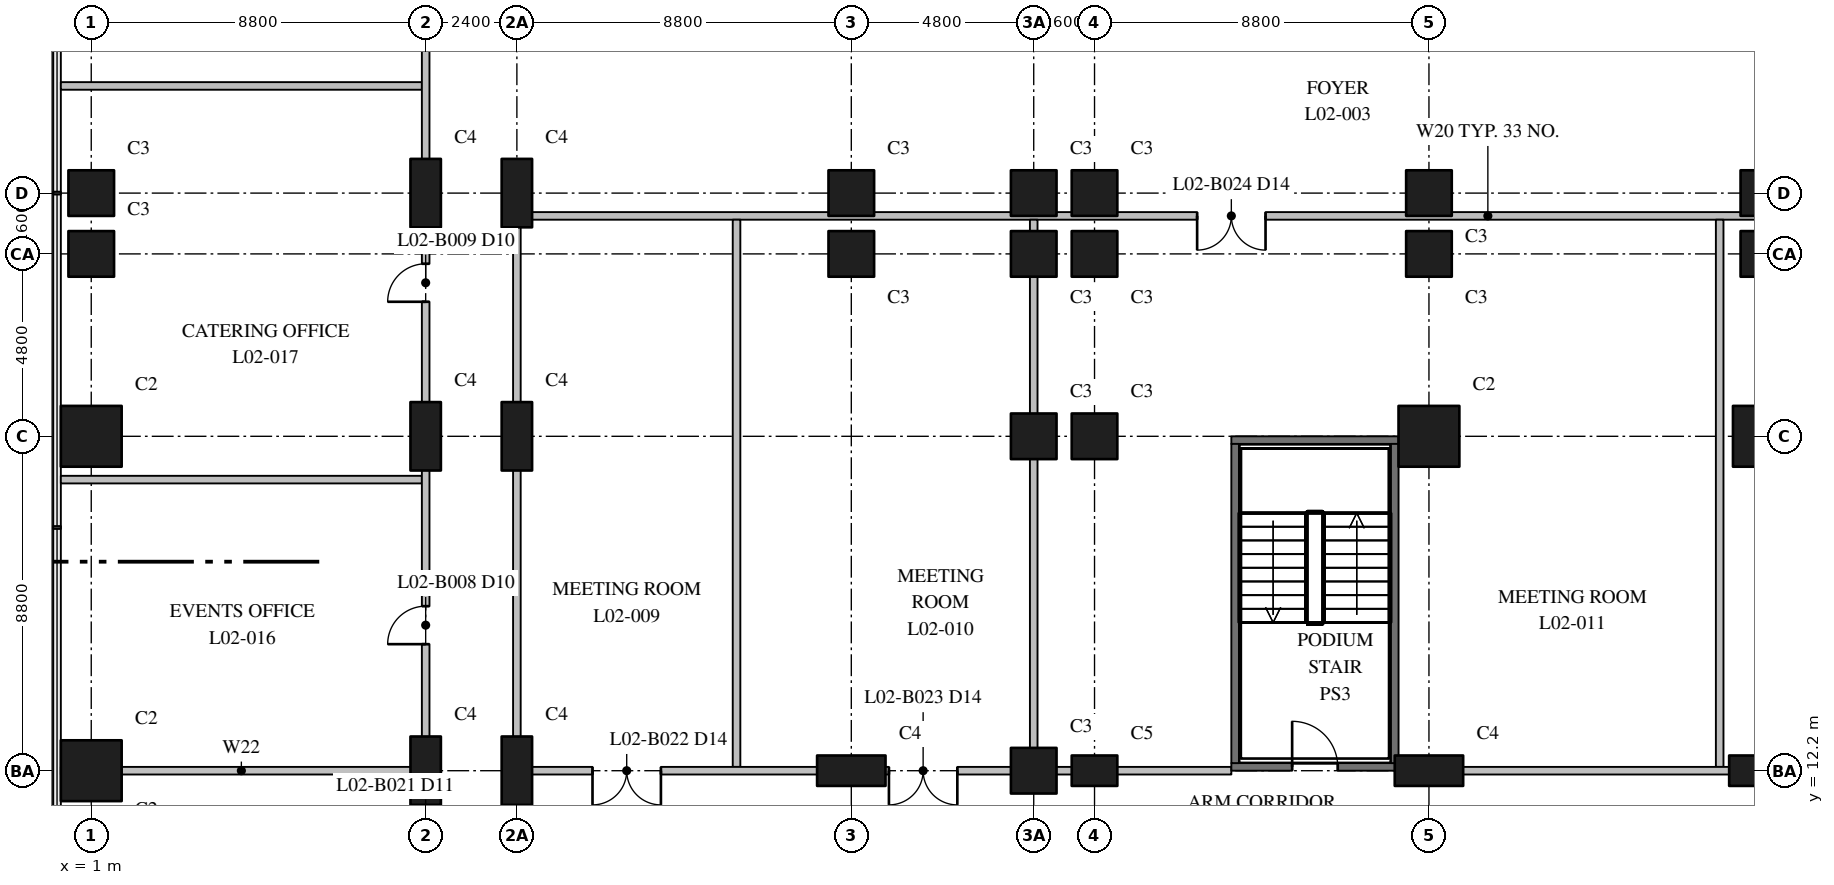
"""IFC4 building model, lengths in metres.
Left out: names, types, materials, properties, quantities, classifications, styles, units other than length and angle.
Written with IfcOpenShell. Run it as: python <this file> out.ifc"""

import sys

from ifc_helpers import new_model, si_unit, direction, frame, frame_2d, origin, origin_2d, place, context, subcontext, project, spatial, rectangle, extrude, element, fill, save


model = new_model("IFC4")
c1 = context("Model", 3, precision=1e-05, world=origin(), true_north=direction((0.0, 1.0)))
c2 = subcontext(c1, "Body", "Model", "MODEL_VIEW")
j1 = project(units=[si_unit("LENGTHUNIT", "METRE"), si_unit("PLANEANGLEUNIT", "RADIAN")], contexts=[c1])
p1 = place(None, origin())
s1 = spatial("IfcSite", under=j1, at=p1, CompositionType="ELEMENT")
p2 = place(p1, origin())
s2 = spatial("IfcBuilding", under=s1, at=p2, CompositionType="ELEMENT")
p3 = place(p2, frame((0.0, 0.0, 13.0)))
s3 = spatial("IfcBuildingStorey", under=s2, at=p3, CompositionType="ELEMENT", Elevation=13.0)
for number, where, z_axis, x_axis in (
    (1, (1.0, 12.2, 0.0), (0.0, 0.0, 1.0), (1.0, 0.0, 0.0)),
    (2, (1.0, 21.0, 0.0), (0.0, 0.0, 1.0), (1.0, 0.0, 0.0)),
):
    element("IfcColumn", number, at=place(p3, frame(where, z_axis=z_axis, x_axis=x_axis)), inside=s3, PredefinedType="COLUMN", context=c2, shape_type="SweptSolid", body=[
        extrude(rectangle(XDim=1.6, YDim=1.6, at=origin_2d()), origin(), (0.0, 0.0, 1.0), 5.0),
    ])
for number, where, z_axis, x_axis in (
    (3, (1.0, 25.8, 0.0), (0.0, 0.0, 1.0), (1.0, 0.0, 0.0)),
    (4, (1.0, 27.4, 0.0), (0.0, 0.0, 1.0), (1.0, 0.0, 0.0)),
):
    element("IfcColumn", number, at=place(p3, frame(where, z_axis=z_axis, x_axis=x_axis)), inside=s3, PredefinedType="COLUMN", context=c2, shape_type="SweptSolid", body=[
        extrude(rectangle(XDim=1.2, YDim=1.2, at=origin_2d()), origin(), (0.0, 0.0, 1.0), 5.0),
    ])
for number, where, z_axis, x_axis in (
    (5, (9.8, 12.2, 0.0), (0.0, 0.0, 1.0), (0.0, 1.0, 0.0)),
    (6, (9.8, 21.0, 0.0), (0.0, 0.0, 1.0), (0.0, 1.0, 0.0)),
    (7, (9.8, 27.4, 0.0), (0.0, 0.0, 1.0), (0.0, 1.0, 0.0)),
    (8, (12.2, 12.2, 0.0), (0.0, 0.0, 1.0), (0.0, 1.0, 0.0)),
    (9, (12.2, 21.0, 0.0), (0.0, 0.0, 1.0), (0.0, 1.0, 0.0)),
    (10, (12.2, 27.4, 0.0), (0.0, 0.0, 1.0), (0.0, 1.0, 0.0)),
    (11, (21.0, 12.2, 0.0), (0.0, 0.0, 1.0), (1.0, 0.0, 0.0)),
):
    element("IfcColumn", number, at=place(p3, frame(where, z_axis=z_axis, x_axis=x_axis)), inside=s3, PredefinedType="COLUMN", context=c2, shape_type="SweptSolid", body=[
        extrude(rectangle(XDim=1.8, YDim=0.8, at=origin_2d()), origin(), (0.0, 0.0, 1.0), 5.0),
    ])
for number, where, z_axis, x_axis in (
    (12, (21.0, 25.8, 0.0), (0.0, 0.0, 1.0), (1.0, 0.0, 0.0)),
    (13, (21.0, 27.4, 0.0), (0.0, 0.0, 1.0), (1.0, 0.0, 0.0)),
    (14, (25.8, 12.2, 0.0), (0.0, 0.0, 1.0), (1.0, 0.0, 0.0)),
    (15, (25.8, 21.0, 0.0), (0.0, 0.0, 1.0), (1.0, 0.0, 0.0)),
    (16, (25.8, 25.8, 0.0), (0.0, 0.0, 1.0), (1.0, 0.0, 0.0)),
    (17, (25.8, 27.4, 0.0), (0.0, 0.0, 1.0), (1.0, 0.0, 0.0)),
):
    element("IfcColumn", number, at=place(p3, frame(where, z_axis=z_axis, x_axis=x_axis)), inside=s3, PredefinedType="COLUMN", context=c2, shape_type="SweptSolid", body=[
        extrude(rectangle(XDim=1.2, YDim=1.2, at=origin_2d()), origin(), (0.0, 0.0, 1.0), 5.0),
    ])
p4 = place(p3, frame((27.4, 12.2, 0.0), z_axis=(0.0, 0.0, 1.0), x_axis=(1.0, 0.0, 0.0)))
e18 = element("IfcColumn", 18, at=p4, inside=s3, PredefinedType="COLUMN", context=c2, shape_type="SweptSolid", body=[
    extrude(rectangle(XDim=1.2, YDim=0.8, at=origin_2d()), origin(), (0.0, 0.0, 1.0), 5.0),
])
for number, where, z_axis, x_axis in (
    (19, (27.4, 21.0, 0.0), (0.0, 0.0, 1.0), (1.0, 0.0, 0.0)),
    (20, (27.4, 25.8, 0.0), (0.0, 0.0, 1.0), (1.0, 0.0, 0.0)),
):
    element("IfcColumn", number, at=place(p3, frame(where, z_axis=z_axis, x_axis=x_axis)), inside=s3, PredefinedType="COLUMN", context=c2, shape_type="SweptSolid", body=[
        extrude(rectangle(XDim=1.2, YDim=1.2, at=origin_2d()), origin(), (0.0, 0.0, 1.0), 5.0),
    ])
p5 = place(p3, frame((36.2, 12.2, 0.0), z_axis=(0.0, 0.0, 1.0), x_axis=(1.0, 0.0, 0.0)))
e21 = element("IfcColumn", 21, at=p5, inside=s3, PredefinedType="COLUMN", context=c2, shape_type="SweptSolid", body=[
    extrude(rectangle(XDim=1.8, YDim=0.8, at=origin_2d()), origin(), (0.0, 0.0, 1.0), 5.0),
])
p6 = place(p3, frame((36.2, 21.0, 0.0), z_axis=(0.0, 0.0, 1.0), x_axis=(1.0, 0.0, 0.0)))
e22 = element("IfcColumn", 22, at=p6, inside=s3, PredefinedType="COLUMN", context=c2, shape_type="SweptSolid", body=[
    extrude(rectangle(XDim=1.6, YDim=1.6, at=origin_2d()), origin(), (0.0, 0.0, 1.0), 5.0),
])
p7 = place(p3, frame((36.2, 25.8, 0.0), z_axis=(0.0, 0.0, 1.0), x_axis=(1.0, 0.0, 0.0)))
e23 = element("IfcColumn", 23, at=p7, inside=s3, PredefinedType="COLUMN", context=c2, shape_type="SweptSolid", body=[
    extrude(rectangle(XDim=1.2, YDim=1.2, at=origin_2d()), origin(), (0.0, 0.0, 1.0), 5.0),
])
p8 = place(p3, frame((45.0, 12.2, 0.0), z_axis=(0.0, 0.0, 1.0), x_axis=(1.0, 0.0, 0.0)))
e24 = element("IfcColumn", 24, at=p8, inside=s3, PredefinedType="COLUMN", context=c2, shape_type="SweptSolid", body=[
    extrude(rectangle(XDim=1.8, YDim=0.8, at=origin_2d()), origin(), (0.0, 0.0, 1.0), 5.0),
])
p9 = place(p3, frame((45.0, 21.0, 0.0), z_axis=(0.0, 0.0, 1.0), x_axis=(1.0, 0.0, 0.0)))
e25 = element("IfcColumn", 25, at=p9, inside=s3, PredefinedType="COLUMN", context=c2, shape_type="SweptSolid", body=[
    extrude(rectangle(XDim=1.6, YDim=1.6, at=origin_2d()), origin(), (0.0, 0.0, 1.0), 5.0),
])
for number, where, z_axis, x_axis in (
    (26, (45.0, 25.8, 0.0), (0.0, 0.0, 1.0), (1.0, 0.0, 0.0)),
    (27, (27.4, 27.4, 0.0), (0.0, 0.0, 1.0), (1.0, 0.0, 0.0)),
    (28, (36.2, 27.4, 0.0), (0.0, 0.0, 1.0), (1.0, 0.0, 0.0)),
    (29, (45.0, 27.4, 0.0), (0.0, 0.0, 1.0), (1.0, 0.0, 0.0)),
):
    element("IfcColumn", number, at=place(p3, frame(where, z_axis=z_axis, x_axis=x_axis)), inside=s3, PredefinedType="COLUMN", context=c2, shape_type="SweptSolid", body=[
        extrude(rectangle(XDim=1.2, YDim=1.2, at=origin_2d()), origin(), (0.0, 0.0, 1.0), 5.0),
    ])
p10 = place(p3, frame((31.0, 12.3, 0.0), z_axis=(0.0, 0.0, 1.0), x_axis=(1.0, 0.0, 0.0)))
e30 = element("IfcWall", 30, at=p10, inside=s3, PredefinedType="SHEAR", context=c2, shape_type="SweptSolid", body=[
    extrude(rectangle(XDim=4.4, YDim=0.2, at=frame_2d((2.2, 0.0))), origin(), (0.0, 0.0, 1.0), 4.6),
])
p11 = place(p10, frame((1.6, 0.0, 0.0)))
e31 = element("IfcOpeningElement", 31, at=p11, cuts=e30, PredefinedType="OPENING", context=c2, shape_type="SweptSolid", body=[
    extrude(rectangle(XDim=1.2, YDim=2.1, at=frame_2d((0.6, 1.05))), frame((0.0, 0.11, 0.0), z_axis=(0.0, -1.0, 0.0), x_axis=(1.0, 0.0, 0.0)), (0.0, 0.0, 1.0), 0.22),
])
p12 = place(p3, frame((31.0, 20.9, 0.0), z_axis=(0.0, 0.0, 1.0), x_axis=(1.0, 0.0, 0.0)))
e32 = element("IfcWall", 32, at=p12, inside=s3, PredefinedType="SHEAR", context=c2, shape_type="SweptSolid", body=[
    extrude(rectangle(XDim=4.4, YDim=0.2, at=frame_2d((2.2, 0.0))), origin(), (0.0, 0.0, 1.0), 4.6),
])
for number, where, z_axis, x_axis in (
    (33, (31.1, 12.4, 0.0), (0.0, 0.0, 1.0), (0.0, 1.0, 0.0)),
    (34, (35.3, 12.4, 0.0), (0.0, 0.0, 1.0), (0.0, 1.0, 0.0)),
):
    element("IfcWall", number, at=place(p3, frame(where, z_axis=z_axis, x_axis=x_axis)), inside=s3, PredefinedType="SHEAR", context=c2, shape_type="SweptSolid", body=[
        extrude(rectangle(XDim=8.4, YDim=0.2, at=frame_2d((4.2, 0.0))), origin(), (0.0, 0.0, 1.0), 4.6),
    ])
p13 = place(p3, frame((0.2, 12.2, 0.0), z_axis=(0.0, 0.0, 1.0), x_axis=(1.0, 0.0, 0.0)))
e35 = element("IfcWall", 35, at=p13, inside=s3, PredefinedType="PARTITIONING", context=c2, shape_type="SweptSolid", body=[
    extrude(rectangle(XDim=9.5, YDim=0.2, at=frame_2d((4.75, 0.0))), origin(), (0.0, 0.0, 1.0), 4.6),
])
p14 = place(p3, frame((12.1, 12.2, 0.0), z_axis=(0.0, 0.0, 1.0), x_axis=(1.0, 0.0, 0.0)))
e36 = element("IfcWall", 36, at=p14, inside=s3, PredefinedType="PARTITIONING", context=c2, shape_type="SweptSolid", body=[
    extrude(rectangle(XDim=18.9, YDim=0.2, at=frame_2d((9.45, 0.0))), origin(), (0.0, 0.0, 1.0), 4.6),
])
p15 = place(p14, frame((2.09, 0.0, 0.0)))
e37 = element("IfcOpeningElement", 37, at=p15, cuts=e36, PredefinedType="OPENING", context=c2, shape_type="SweptSolid", body=[
    extrude(rectangle(XDim=1.8, YDim=2.4, at=frame_2d((0.9, 1.2))), frame((0.0, 0.11, 0.0), z_axis=(0.0, -1.0, 0.0), x_axis=(1.0, 0.0, 0.0)), (0.0, 0.0, 1.0), 0.22),
])
p16 = place(p14, frame((9.89, 0.0, 0.0)))
e38 = element("IfcOpeningElement", 38, at=p16, cuts=e36, PredefinedType="OPENING", context=c2, shape_type="SweptSolid", body=[
    extrude(rectangle(XDim=1.8, YDim=2.4, at=frame_2d((0.9, 1.2))), frame((0.0, 0.11, 0.0), z_axis=(0.0, -1.0, 0.0), x_axis=(1.0, 0.0, 0.0)), (0.0, 0.0, 1.0), 0.22),
])
p17 = place(p3, frame((35.4, 12.2, 0.0), z_axis=(0.0, 0.0, 1.0), x_axis=(1.0, 0.0, 0.0)))
e39 = element("IfcWall", 39, at=p17, inside=s3, PredefinedType="PARTITIONING", context=c2, shape_type="SweptSolid", body=[
    extrude(rectangle(XDim=22.4, YDim=0.2, at=frame_2d((11.2, 0.0))), origin(), (0.0, 0.0, 1.0), 4.6),
])
p18 = place(p17, frame((12.525, 0.0, 0.0)))
e40 = element("IfcOpeningElement", 40, at=p18, cuts=e39, PredefinedType="OPENING", context=c2, shape_type="SweptSolid", body=[
    extrude(rectangle(XDim=1.8, YDim=2.4, at=frame_2d((0.9, 1.2))), frame((0.0, 0.11, 0.0), z_axis=(0.0, -1.0, 0.0), x_axis=(1.0, 0.0, 0.0)), (0.0, 0.0, 1.0), 0.22),
])
p19 = place(p3, frame((12.1, 26.8, 0.0), z_axis=(0.0, 0.0, 1.0), x_axis=(1.0, 0.0, 0.0)))
e41 = element("IfcWall", 41, at=p19, inside=s3, PredefinedType="PARTITIONING", context=c2, shape_type="SweptSolid", body=[
    extrude(rectangle(XDim=51.3, YDim=0.2, at=frame_2d((25.65, 0.0))), origin(), (0.0, 0.0, 1.0), 4.6),
])
p20 = place(p19, frame((18.0, 0.0, 0.0)))
e42 = element("IfcOpeningElement", 42, at=p20, cuts=e41, PredefinedType="OPENING", context=c2, shape_type="SweptSolid", body=[
    extrude(rectangle(XDim=1.8, YDim=2.4, at=frame_2d((0.9, 1.2))), frame((0.0, 0.11, 0.0), z_axis=(0.0, -1.0, 0.0), x_axis=(1.0, 0.0, 0.0)), (0.0, 0.0, 1.0), 0.22),
])
p21 = place(p19, frame((45.2, 0.0, 0.0)))
e43 = element("IfcOpeningElement", 43, at=p21, cuts=e41, PredefinedType="OPENING", context=c2, shape_type="SweptSolid", body=[
    extrude(rectangle(XDim=1.8, YDim=2.4, at=frame_2d((0.9, 1.2))), frame((0.0, 0.11, 0.0), z_axis=(0.0, -1.0, 0.0), x_axis=(1.0, 0.0, 0.0)), (0.0, 0.0, 1.0), 0.22),
])
for number, where, z_axis, x_axis in (
    (44, (0.2, 19.86, 0.0), (0.0, 0.0, 1.0), (1.0, 0.0, 0.0)),
    (45, (0.2, 30.22, 0.0), (0.0, 0.0, 1.0), (1.0, 0.0, 0.0)),
):
    element("IfcWall", number, at=place(p3, frame(where, z_axis=z_axis, x_axis=x_axis)), inside=s3, PredefinedType="PARTITIONING", context=c2, shape_type="SweptSolid", body=[
        extrude(rectangle(XDim=9.5, YDim=0.2, at=frame_2d((4.75, 0.0))), origin(), (0.0, 0.0, 1.0), 4.6),
    ])
p22 = place(p3, frame((9.8, 9.8, 0.0), z_axis=(0.0, 0.0, 1.0), x_axis=(0.0, 1.0, 0.0)))
e46 = element("IfcWall", 46, at=p22, inside=s3, PredefinedType="PARTITIONING", context=c2, shape_type="SweptSolid", body=[
    extrude(rectangle(XDim=48.0, YDim=0.2, at=frame_2d((24.0, 0.0))), origin(), (0.0, 0.0, 1.0), 4.6),
])
p23 = place(p22, frame((5.73, 0.0, 0.0)))
e47 = element("IfcOpeningElement", 47, at=p23, cuts=e46, PredefinedType="OPENING", context=c2, shape_type="SweptSolid", body=[
    extrude(rectangle(XDim=1.0, YDim=2.1, at=frame_2d((0.5, 1.05))), frame((0.0, 0.11, 0.0), z_axis=(0.0, -1.0, 0.0), x_axis=(1.0, 0.0, 0.0)), (0.0, 0.0, 1.0), 0.22),
])
p24 = place(p22, frame((14.74, 0.0, 0.0)))
e48 = element("IfcOpeningElement", 48, at=p24, cuts=e46, PredefinedType="OPENING", context=c2, shape_type="SweptSolid", body=[
    extrude(rectangle(XDim=1.0, YDim=2.1, at=frame_2d((0.5, 1.05))), frame((0.0, 0.11, 0.0), z_axis=(0.0, -1.0, 0.0), x_axis=(1.0, 0.0, 0.0)), (0.0, 0.0, 1.0), 0.22),
])
p25 = place(p22, frame((23.075, 0.0, 0.0)))
e49 = element("IfcOpeningElement", 49, at=p25, cuts=e46, PredefinedType="OPENING", context=c2, shape_type="SweptSolid", body=[
    extrude(rectangle(XDim=1.0, YDim=2.1, at=frame_2d((0.5, 1.05))), frame((0.0, 0.11, 0.0), z_axis=(0.0, -1.0, 0.0), x_axis=(1.0, 0.0, 0.0)), (0.0, 0.0, 1.0), 0.22),
])
p26 = place(p22, frame((29.985, 0.0, 0.0)))
e50 = element("IfcOpeningElement", 50, at=p26, cuts=e46, PredefinedType="OPENING", context=c2, shape_type="SweptSolid", body=[
    extrude(rectangle(XDim=1.0, YDim=2.1, at=frame_2d((0.5, 1.05))), frame((0.0, 0.11, 0.0), z_axis=(0.0, -1.0, 0.0), x_axis=(1.0, 0.0, 0.0)), (0.0, 0.0, 1.0), 0.22),
])
p27 = place(p22, frame((36.668, 0.0, 0.0)))
e51 = element("IfcOpeningElement", 51, at=p27, cuts=e46, PredefinedType="OPENING", context=c2, shape_type="SweptSolid", body=[
    extrude(rectangle(XDim=1.0, YDim=2.1, at=frame_2d((0.5, 1.05))), frame((0.0, 0.11, 0.0), z_axis=(0.0, -1.0, 0.0), x_axis=(1.0, 0.0, 0.0)), (0.0, 0.0, 1.0), 0.22),
])
p28 = place(p22, frame((44.967, 0.0, 0.0)))
e52 = element("IfcOpeningElement", 52, at=p28, cuts=e46, PredefinedType="OPENING", context=c2, shape_type="SweptSolid", body=[
    extrude(rectangle(XDim=1.0, YDim=2.1, at=frame_2d((0.5, 1.05))), frame((0.0, 0.11, 0.0), z_axis=(0.0, -1.0, 0.0), x_axis=(1.0, 0.0, 0.0)), (0.0, 0.0, 1.0), 0.22),
])
p29 = place(p22, frame((0.4, 0.0, 0.0)))
e53 = element("IfcOpeningElement", 53, at=p29, cuts=e46, PredefinedType="OPENING", context=c2, shape_type="SweptSolid", body=[
    extrude(rectangle(XDim=1.0, YDim=2.1, at=frame_2d((0.5, 1.05))), frame((0.0, 0.11, 0.0), z_axis=(0.0, -1.0, 0.0), x_axis=(1.0, 0.0, 0.0)), (0.0, 0.0, 1.0), 0.22),
])
for number, where, z_axis, x_axis in (
    (54, (12.2, 12.3, 0.0), (0.0, 0.0, 1.0), (0.0, 1.0, 0.0)),
    (55, (17.98, 12.3, 0.0), (0.0, 0.0, 1.0), (0.0, 1.0, 0.0)),
    (56, (25.8, 12.3, 0.0), (0.0, 0.0, 1.0), (0.0, 1.0, 0.0)),
    (57, (43.85, 12.3, 0.0), (0.0, 0.0, 1.0), (0.0, 1.0, 0.0)),
):
    element("IfcWall", number, at=place(p3, frame(where, z_axis=z_axis, x_axis=x_axis)), inside=s3, PredefinedType="PARTITIONING", context=c2, shape_type="SweptSolid", body=[
        extrude(rectangle(XDim=14.4, YDim=0.2, at=frame_2d((7.2, 0.0))), origin(), (0.0, 0.0, 1.0), 4.6),
    ])
p30 = place(p11, origin())
e58 = element("IfcDoor", 58, at=p30, inside=s3, OperationType="SINGLE_SWING_LEFT", PredefinedType="DOOR", context=c2, shape_type="SweptSolid", body=[
    extrude(rectangle(XDim=1.2, YDim=2.1, at=frame_2d((0.6, 1.05))), frame((0.0, 0.025, 0.0), z_axis=(0.0, -1.0, 0.0), x_axis=(1.0, 0.0, 0.0)), (0.0, 0.0, 1.0), 0.05),
])
fill(e31, e58)
p31 = place(p23, origin())
e59 = element("IfcDoor", 59, at=p31, inside=s3, OperationType="SINGLE_SWING_LEFT", PredefinedType="DOOR", context=c2, shape_type="SweptSolid", body=[
    extrude(rectangle(XDim=1.0, YDim=2.1, at=frame_2d((0.5, 1.05))), frame((0.0, 0.025, 0.0), z_axis=(0.0, -1.0, 0.0), x_axis=(1.0, 0.0, 0.0)), (0.0, 0.0, 1.0), 0.05),
])
fill(e47, e59)
p32 = place(p24, origin())
e60 = element("IfcDoor", 60, at=p32, inside=s3, OperationType="SINGLE_SWING_LEFT", PredefinedType="DOOR", context=c2, shape_type="SweptSolid", body=[
    extrude(rectangle(XDim=1.0, YDim=2.1, at=frame_2d((0.5, 1.05))), frame((0.0, 0.025, 0.0), z_axis=(0.0, -1.0, 0.0), x_axis=(1.0, 0.0, 0.0)), (0.0, 0.0, 1.0), 0.05),
])
fill(e48, e60)
p33 = place(p15, frame((1.8, 0.0, 0.0), z_axis=(0.0, 0.0, 1.0), x_axis=(-1.0, 0.0, 0.0)))
e61 = element("IfcDoor", 61, at=p33, inside=s3, OperationType="DOUBLE_DOOR_SINGLE_SWING", PredefinedType="DOOR", context=c2, shape_type="SweptSolid", body=[
    extrude(rectangle(XDim=1.8, YDim=2.4, at=frame_2d((0.9, 1.2))), frame((0.0, 0.025, 0.0), z_axis=(0.0, -1.0, 0.0), x_axis=(1.0, 0.0, 0.0)), (0.0, 0.0, 1.0), 0.05),
])
fill(e37, e61)
p34 = place(p16, frame((1.8, 0.0, 0.0), z_axis=(0.0, 0.0, 1.0), x_axis=(-1.0, 0.0, 0.0)))
e62 = element("IfcDoor", 62, at=p34, inside=s3, OperationType="DOUBLE_DOOR_SINGLE_SWING", PredefinedType="DOOR", context=c2, shape_type="SweptSolid", body=[
    extrude(rectangle(XDim=1.8, YDim=2.4, at=frame_2d((0.9, 1.2))), frame((0.0, 0.025, 0.0), z_axis=(0.0, -1.0, 0.0), x_axis=(1.0, 0.0, 0.0)), (0.0, 0.0, 1.0), 0.05),
])
fill(e38, e62)
p35 = place(p20, frame((1.8, 0.0, 0.0), z_axis=(0.0, 0.0, 1.0), x_axis=(-1.0, 0.0, 0.0)))
e63 = element("IfcDoor", 63, at=p35, inside=s3, OperationType="DOUBLE_DOOR_SINGLE_SWING", PredefinedType="DOOR", context=c2, shape_type="SweptSolid", body=[
    extrude(rectangle(XDim=1.8, YDim=2.4, at=frame_2d((0.9, 1.2))), frame((0.0, 0.025, 0.0), z_axis=(0.0, -1.0, 0.0), x_axis=(1.0, 0.0, 0.0)), (0.0, 0.0, 1.0), 0.05),
])
fill(e42, e63)
save(model, sys.argv[1])
